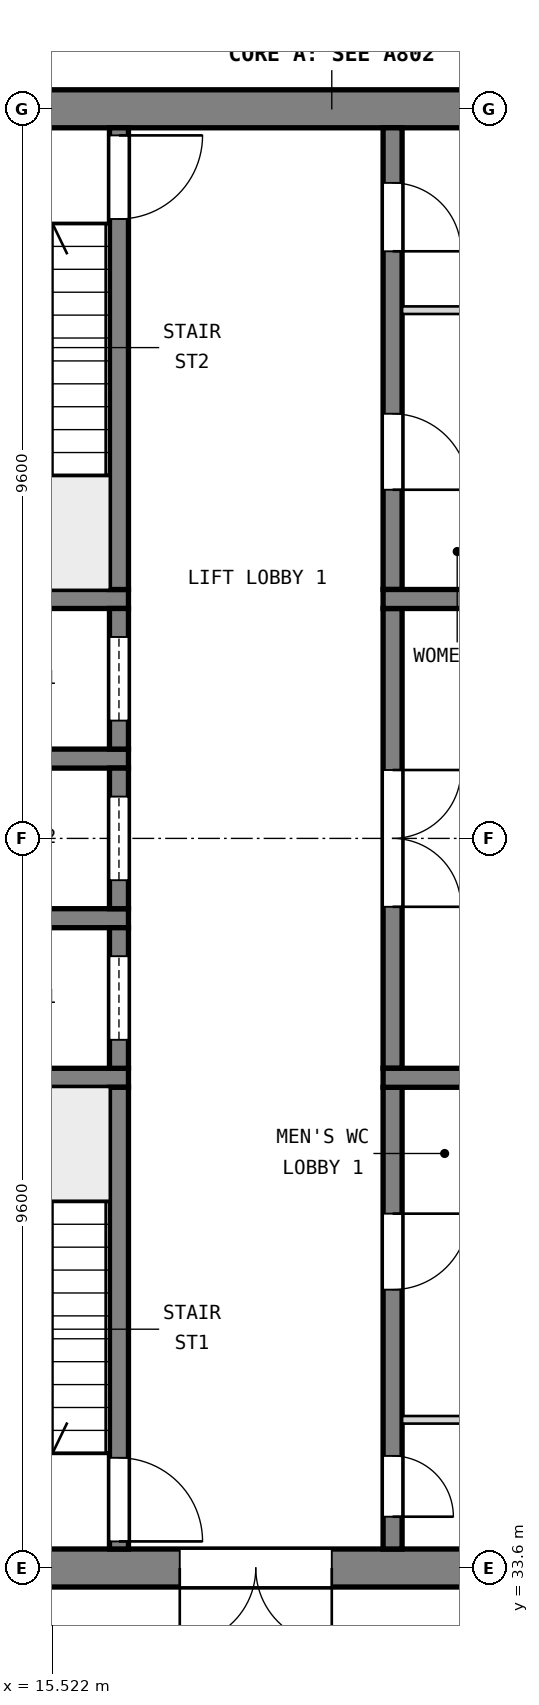
"""IFC4 building model, lengths in metres.
Left out: names, types, materials, properties, quantities, classifications, styles, units other than length and angle.
Written with IfcOpenShell. Run it as: python <this file> out.ifc"""

import sys

from ifc_helpers import new_model, si_unit, direction, frame, frame_2d, origin, place, context, subcontext, project, spatial, rectangle, extrude, element, fill, save


model = new_model("IFC4")
c1 = context("Model", 3, precision=1e-05, world=origin(), true_north=direction((0.0, 1.0)))
c2 = subcontext(c1, "Body", "Model", "MODEL_VIEW")
j1 = project(units=[si_unit("LENGTHUNIT", "METRE"), si_unit("PLANEANGLEUNIT", "RADIAN")], contexts=[c1])
p1 = place(None, origin())
s1 = spatial("IfcSite", under=j1, at=p1, CompositionType="ELEMENT")
p2 = place(p1, origin())
s2 = spatial("IfcBuilding", under=s1, at=p2, CompositionType="ELEMENT")
p3 = place(p2, origin())
s3 = spatial("IfcBuildingStorey", under=s2, at=p3, CompositionType="ELEMENT", Elevation=0.0)
p4 = place(p3, frame((12.55, 52.8, 0.0), z_axis=(0.0, 0.0, 1.0), x_axis=(1.0, 0.0, 0.0)))
e1 = element("IfcWall", 1, at=p4, inside=s3, PredefinedType="SHEAR", context=c2, shape_type="SweptSolid", body=[
    extrude(rectangle(XDim=13.3, YDim=0.5, at=frame_2d((6.65, 0.0))), origin(), (0.0, 0.0, 1.0), 4.2),
])
p5 = place(p4, frame((0.55, 0.0, 0.0)))
e2 = element("IfcOpeningElement", 2, at=p5, cuts=e1, PredefinedType="OPENING", context=c2, shape_type="SweptSolid", body=[
    extrude(rectangle(XDim=1.8, YDim=2.1, at=frame_2d((0.9, 1.05))), frame((0.0, 0.26, 0.0), z_axis=(0.0, -1.0, 0.0), x_axis=(1.0, 0.0, 0.0)), (0.0, 0.0, 1.0), 0.52),
])
p6 = place(p3, frame((12.55, 33.6, 0.0), z_axis=(0.0, 0.0, 1.0), x_axis=(1.0, 0.0, 0.0)))
e3 = element("IfcWall", 3, at=p6, inside=s3, PredefinedType="SHEAR", context=c2, shape_type="SweptSolid", body=[
    extrude(rectangle(XDim=13.3, YDim=0.5, at=frame_2d((6.65, 0.0))), origin(), (0.0, 0.0, 1.0), 4.2),
])
p7 = place(p6, frame((4.65, 0.0, 0.0)))
e4 = element("IfcOpeningElement", 4, at=p7, cuts=e3, PredefinedType="OPENING", context=c2, shape_type="SweptSolid", body=[
    extrude(rectangle(XDim=2.0, YDim=2.1, at=frame_2d((1.0, 1.05))), frame((0.0, 0.26, 0.0), z_axis=(0.0, -1.0, 0.0), x_axis=(1.0, 0.0, 0.0)), (0.0, 0.0, 1.0), 0.52),
])
p8 = place(p6, frame((0.55, 0.0, 0.0)))
e5 = element("IfcOpeningElement", 5, at=p8, cuts=e3, PredefinedType="OPENING", context=c2, shape_type="SweptSolid", body=[
    extrude(rectangle(XDim=1.8, YDim=2.1, at=frame_2d((0.9, 1.05))), frame((0.0, 0.26, 0.0), z_axis=(0.0, -1.0, 0.0), x_axis=(1.0, 0.0, 0.0)), (0.0, 0.0, 1.0), 0.52),
])
for number, where, z_axis, x_axis in (
    (6, (13.05, 40.05, 0.0), (0.0, 0.0, 1.0), (1.0, 0.0, 0.0)),
    (7, (13.05, 42.15, 0.0), (0.0, 0.0, 1.0), (1.0, 0.0, 0.0)),
    (8, (13.05, 44.25, 0.0), (0.0, 0.0, 1.0), (1.0, 0.0, 0.0)),
    (9, (13.05, 46.35, 0.0), (0.0, 0.0, 1.0), (1.0, 0.0, 0.0)),
):
    element("IfcWall", number, at=place(p3, frame(where, z_axis=z_axis, x_axis=x_axis)), inside=s3, PredefinedType="SOLIDWALL", context=c2, shape_type="SweptSolid", body=[
        extrude(rectangle(XDim=3.475, YDim=0.25, at=frame_2d((1.737, 0.0))), origin(), (0.0, 0.0, 1.0), 3.9),
    ])
p9 = place(p3, frame((16.4, 33.85, 0.0), z_axis=(0.0, 0.0, 1.0), x_axis=(0.0, 1.0, 0.0)))
e10 = element("IfcWall", 10, at=p9, inside=s3, PredefinedType="SOLIDWALL", context=c2, shape_type="SweptSolid", body=[
    extrude(rectangle(XDim=6.075, YDim=0.25, at=frame_2d((3.038, 0.0))), origin(), (0.0, 0.0, 1.0), 3.9),
])
p10 = place(p9, frame((0.1, 0.0, 0.0)))
e11 = element("IfcOpeningElement", 11, at=p10, cuts=e10, PredefinedType="OPENING", context=c2, shape_type="SweptSolid", body=[
    extrude(rectangle(XDim=1.1, YDim=2.1, at=frame_2d((0.55, 1.05))), frame((0.0, 0.135, 0.0), z_axis=(0.0, -1.0, 0.0), x_axis=(1.0, 0.0, 0.0)), (0.0, 0.0, 1.0), 0.27),
])
p11 = place(p3, frame((16.4, 40.175, 0.0), z_axis=(0.0, 0.0, 1.0), x_axis=(0.0, 1.0, 0.0)))
e12 = element("IfcWall", 12, at=p11, inside=s3, PredefinedType="SOLIDWALL", context=c2, shape_type="SweptSolid", body=[
    extrude(rectangle(XDim=1.85, YDim=0.25, at=frame_2d((0.925, 0.0))), origin(), (0.0, 0.0, 1.0), 3.9),
])
p12 = place(p11, frame((0.375, 0.0, 0.0)))
e13 = element("IfcOpeningElement", 13, at=p12, cuts=e12, PredefinedType="OPENING", context=c2, shape_type="SweptSolid", body=[
    extrude(rectangle(XDim=1.1, YDim=2.1, at=frame_2d((0.55, 1.05))), frame((0.0, 0.135, 0.0), z_axis=(0.0, -1.0, 0.0), x_axis=(1.0, 0.0, 0.0)), (0.0, 0.0, 1.0), 0.27),
])
p13 = place(p3, frame((16.4, 42.275, 0.0), z_axis=(0.0, 0.0, 1.0), x_axis=(0.0, 1.0, 0.0)))
e14 = element("IfcWall", 14, at=p13, inside=s3, PredefinedType="SOLIDWALL", context=c2, shape_type="SweptSolid", body=[
    extrude(rectangle(XDim=1.85, YDim=0.25, at=frame_2d((0.925, 0.0))), origin(), (0.0, 0.0, 1.0), 3.9),
])
p14 = place(p13, frame((0.375, 0.0, 0.0)))
e15 = element("IfcOpeningElement", 15, at=p14, cuts=e14, PredefinedType="OPENING", context=c2, shape_type="SweptSolid", body=[
    extrude(rectangle(XDim=1.1, YDim=2.1, at=frame_2d((0.55, 1.05))), frame((0.0, 0.135, 0.0), z_axis=(0.0, -1.0, 0.0), x_axis=(1.0, 0.0, 0.0)), (0.0, 0.0, 1.0), 0.27),
])
p15 = place(p3, frame((16.4, 44.375, 0.0), z_axis=(0.0, 0.0, 1.0), x_axis=(0.0, 1.0, 0.0)))
e16 = element("IfcWall", 16, at=p15, inside=s3, PredefinedType="SOLIDWALL", context=c2, shape_type="SweptSolid", body=[
    extrude(rectangle(XDim=1.85, YDim=0.25, at=frame_2d((0.925, 0.0))), origin(), (0.0, 0.0, 1.0), 3.9),
])
p16 = place(p15, frame((0.375, 0.0, 0.0)))
e17 = element("IfcOpeningElement", 17, at=p16, cuts=e16, PredefinedType="OPENING", context=c2, shape_type="SweptSolid", body=[
    extrude(rectangle(XDim=1.1, YDim=2.1, at=frame_2d((0.55, 1.05))), frame((0.0, 0.135, 0.0), z_axis=(0.0, -1.0, 0.0), x_axis=(1.0, 0.0, 0.0)), (0.0, 0.0, 1.0), 0.27),
])
p17 = place(p3, frame((16.4, 46.475, 0.0), z_axis=(0.0, 0.0, 1.0), x_axis=(0.0, 1.0, 0.0)))
e18 = element("IfcWall", 18, at=p17, inside=s3, PredefinedType="SOLIDWALL", context=c2, shape_type="SweptSolid", body=[
    extrude(rectangle(XDim=6.075, YDim=0.25, at=frame_2d((3.038, 0.0))), origin(), (0.0, 0.0, 1.0), 3.9),
])
p18 = place(p17, frame((4.875, 0.0, 0.0)))
e19 = element("IfcOpeningElement", 19, at=p18, cuts=e18, PredefinedType="OPENING", context=c2, shape_type="SweptSolid", body=[
    extrude(rectangle(XDim=1.1, YDim=2.1, at=frame_2d((0.55, 1.05))), frame((0.0, 0.135, 0.0), z_axis=(0.0, -1.0, 0.0), x_axis=(1.0, 0.0, 0.0)), (0.0, 0.0, 1.0), 0.27),
])
p19 = place(p3, frame((20.0, 33.85, 0.0), z_axis=(0.0, 0.0, 1.0), x_axis=(0.0, 1.0, 0.0)))
e20 = element("IfcWall", 20, at=p19, inside=s3, PredefinedType="SOLIDWALL", context=c2, shape_type="SweptSolid", body=[
    extrude(rectangle(XDim=6.075, YDim=0.25, at=frame_2d((3.038, 0.0))), origin(), (0.0, 0.0, 1.0), 3.9),
])
p20 = place(p19, frame((0.425, 0.0, 0.0)))
e21 = element("IfcOpeningElement", 21, at=p20, cuts=e20, PredefinedType="OPENING", context=c2, shape_type="SweptSolid", body=[
    extrude(rectangle(XDim=0.8, YDim=2.1, at=frame_2d((0.4, 1.05))), frame((0.0, 0.135, 0.0), z_axis=(0.0, -1.0, 0.0), x_axis=(1.0, 0.0, 0.0)), (0.0, 0.0, 1.0), 0.27),
])
p21 = place(p19, frame((3.413, 0.0, 0.0)))
e22 = element("IfcOpeningElement", 22, at=p21, cuts=e20, PredefinedType="OPENING", context=c2, shape_type="SweptSolid", body=[
    extrude(rectangle(XDim=1.0, YDim=2.1, at=frame_2d((0.5, 1.05))), frame((0.0, 0.135, 0.0), z_axis=(0.0, -1.0, 0.0), x_axis=(1.0, 0.0, 0.0)), (0.0, 0.0, 1.0), 0.27),
])
p22 = place(p3, frame((20.0, 40.175, 0.0), z_axis=(0.0, 0.0, 1.0), x_axis=(0.0, 1.0, 0.0)))
e23 = element("IfcWall", 23, at=p22, inside=s3, PredefinedType="SOLIDWALL", context=c2, shape_type="SweptSolid", body=[
    extrude(rectangle(XDim=6.05, YDim=0.25, at=frame_2d((3.025, 0.0))), origin(), (0.0, 0.0, 1.0), 3.9),
])
p23 = place(p22, frame((2.125, 0.0, 0.0)))
e24 = element("IfcOpeningElement", 24, at=p23, cuts=e23, PredefinedType="OPENING", context=c2, shape_type="SweptSolid", body=[
    extrude(rectangle(XDim=1.8, YDim=2.1, at=frame_2d((0.9, 1.05))), frame((0.0, 0.135, 0.0), z_axis=(0.0, -1.0, 0.0), x_axis=(1.0, 0.0, 0.0)), (0.0, 0.0, 1.0), 0.27),
])
p24 = place(p3, frame((20.0, 46.475, 0.0), z_axis=(0.0, 0.0, 1.0), x_axis=(0.0, 1.0, 0.0)))
e25 = element("IfcWall", 25, at=p24, inside=s3, PredefinedType="SOLIDWALL", context=c2, shape_type="SweptSolid", body=[
    extrude(rectangle(XDim=6.075, YDim=0.25, at=frame_2d((3.038, 0.0))), origin(), (0.0, 0.0, 1.0), 3.9),
])
p25 = place(p24, frame((1.312, 0.0, 0.0)))
e26 = element("IfcOpeningElement", 26, at=p25, cuts=e25, PredefinedType="OPENING", context=c2, shape_type="SweptSolid", body=[
    extrude(rectangle(XDim=1.0, YDim=2.1, at=frame_2d((0.5, 1.05))), frame((0.0, 0.135, 0.0), z_axis=(0.0, -1.0, 0.0), x_axis=(1.0, 0.0, 0.0)), (0.0, 0.0, 1.0), 0.27),
])
p26 = place(p24, frame((4.45, 0.0, 0.0)))
e27 = element("IfcOpeningElement", 27, at=p26, cuts=e25, PredefinedType="OPENING", context=c2, shape_type="SweptSolid", body=[
    extrude(rectangle(XDim=0.9, YDim=2.1, at=frame_2d((0.45, 1.05))), frame((0.0, 0.135, 0.0), z_axis=(0.0, -1.0, 0.0), x_axis=(1.0, 0.0, 0.0)), (0.0, 0.0, 1.0), 0.27),
])
for number, where, z_axis, x_axis in (
    (28, (19.875, 40.05, 0.0), (0.0, 0.0, 1.0), (1.0, 0.0, 0.0)),
    (29, (19.875, 46.35, 0.0), (0.0, 0.0, 1.0), (1.0, 0.0, 0.0)),
):
    element("IfcWall", number, at=place(p3, frame(where, z_axis=z_axis, x_axis=x_axis)), inside=s3, PredefinedType="SOLIDWALL", context=c2, shape_type="SweptSolid", body=[
        extrude(rectangle(XDim=5.425, YDim=0.25, at=frame_2d((2.712, 0.0))), origin(), (0.0, 0.0, 1.0), 3.9),
    ])
for number, where, z_axis, x_axis in (
    (30, (20.125, 35.55, 0.0), (0.0, 0.0, 1.0), (1.0, 0.0, 0.0)),
    (31, (20.125, 50.15, 0.0), (0.0, 0.0, 1.0), (1.0, 0.0, 0.0)),
):
    element("IfcWall", number, at=place(p3, frame(where, z_axis=z_axis, x_axis=x_axis)), inside=s3, PredefinedType="PARTITIONING", context=c2, shape_type="SweptSolid", body=[
        extrude(rectangle(XDim=5.175, YDim=0.1, at=frame_2d((2.587, 0.0))), origin(), (0.0, 0.0, 1.0), 3.9),
    ])
p27 = place(p10, frame((1.1, 0.0, 0.0), z_axis=(0.0, 0.0, 1.0), x_axis=(-1.0, 0.0, 0.0)))
e32 = element("IfcDoor", 32, at=p27, inside=s3, OperationType="SINGLE_SWING_RIGHT", PredefinedType="DOOR", context=c2, shape_type="SweptSolid", body=[
    extrude(rectangle(XDim=1.1, YDim=2.1, at=frame_2d((0.55, 1.05))), frame((0.0, 0.025, 0.0), z_axis=(0.0, -1.0, 0.0), x_axis=(1.0, 0.0, 0.0)), (0.0, 0.0, 1.0), 0.05),
])
fill(e11, e32)
p28 = place(p18, frame((1.1, 0.0, 0.0), z_axis=(0.0, 0.0, 1.0), x_axis=(-1.0, 0.0, 0.0)))
e33 = element("IfcDoor", 33, at=p28, inside=s3, OperationType="SINGLE_SWING_LEFT", PredefinedType="DOOR", context=c2, shape_type="SweptSolid", body=[
    extrude(rectangle(XDim=1.1, YDim=2.1, at=frame_2d((0.55, 1.05))), frame((0.0, 0.025, 0.0), z_axis=(0.0, -1.0, 0.0), x_axis=(1.0, 0.0, 0.0)), (0.0, 0.0, 1.0), 0.05),
])
fill(e19, e33)
p29 = place(p12, origin())
e34 = element("IfcDoor", 34, at=p29, inside=s3, OperationType="SLIDING_TO_LEFT", PredefinedType="DOOR", context=c2, shape_type="SweptSolid", body=[
    extrude(rectangle(XDim=1.1, YDim=2.1, at=frame_2d((0.55, 1.05))), frame((0.0, 0.025, 0.0), z_axis=(0.0, -1.0, 0.0), x_axis=(1.0, 0.0, 0.0)), (0.0, 0.0, 1.0), 0.05),
])
fill(e13, e34)
p30 = place(p14, origin())
e35 = element("IfcDoor", 35, at=p30, inside=s3, OperationType="SLIDING_TO_LEFT", PredefinedType="DOOR", context=c2, shape_type="SweptSolid", body=[
    extrude(rectangle(XDim=1.1, YDim=2.1, at=frame_2d((0.55, 1.05))), frame((0.0, 0.025, 0.0), z_axis=(0.0, -1.0, 0.0), x_axis=(1.0, 0.0, 0.0)), (0.0, 0.0, 1.0), 0.05),
])
fill(e15, e35)
p31 = place(p16, origin())
e36 = element("IfcDoor", 36, at=p31, inside=s3, OperationType="SLIDING_TO_LEFT", PredefinedType="DOOR", context=c2, shape_type="SweptSolid", body=[
    extrude(rectangle(XDim=1.1, YDim=2.1, at=frame_2d((0.55, 1.05))), frame((0.0, 0.025, 0.0), z_axis=(0.0, -1.0, 0.0), x_axis=(1.0, 0.0, 0.0)), (0.0, 0.0, 1.0), 0.05),
])
fill(e17, e36)
p32 = place(p23, frame((1.8, 0.0, 0.0), z_axis=(0.0, 0.0, 1.0), x_axis=(-1.0, 0.0, 0.0)))
e37 = element("IfcDoor", 37, at=p32, inside=s3, OperationType="DOUBLE_DOOR_SINGLE_SWING", PredefinedType="DOOR", context=c2, shape_type="SweptSolid", body=[
    extrude(rectangle(XDim=1.8, YDim=2.1, at=frame_2d((0.9, 1.05))), frame((0.0, 0.025, 0.0), z_axis=(0.0, -1.0, 0.0), x_axis=(1.0, 0.0, 0.0)), (0.0, 0.0, 1.0), 0.05),
])
fill(e24, e37)
p33 = place(p20, frame((0.8, 0.0, 0.0), z_axis=(0.0, 0.0, 1.0), x_axis=(-1.0, 0.0, 0.0)))
e38 = element("IfcDoor", 38, at=p33, inside=s3, OperationType="SINGLE_SWING_RIGHT", PredefinedType="DOOR", context=c2, shape_type="SweptSolid", body=[
    extrude(rectangle(XDim=0.8, YDim=2.1, at=frame_2d((0.4, 1.05))), frame((0.0, 0.025, 0.0), z_axis=(0.0, -1.0, 0.0), x_axis=(1.0, 0.0, 0.0)), (0.0, 0.0, 1.0), 0.05),
])
fill(e21, e38)
p34 = place(p21, frame((1.0, 0.0, 0.0), z_axis=(0.0, 0.0, 1.0), x_axis=(-1.0, 0.0, 0.0)))
e39 = element("IfcDoor", 39, at=p34, inside=s3, OperationType="SINGLE_SWING_LEFT", PredefinedType="DOOR", context=c2, shape_type="SweptSolid", body=[
    extrude(rectangle(XDim=1.0, YDim=2.1, at=frame_2d((0.5, 1.05))), frame((0.0, 0.025, 0.0), z_axis=(0.0, -1.0, 0.0), x_axis=(1.0, 0.0, 0.0)), (0.0, 0.0, 1.0), 0.05),
])
fill(e22, e39)
p35 = place(p25, frame((1.0, 0.0, 0.0), z_axis=(0.0, 0.0, 1.0), x_axis=(-1.0, 0.0, 0.0)))
e40 = element("IfcDoor", 40, at=p35, inside=s3, OperationType="SINGLE_SWING_RIGHT", PredefinedType="DOOR", context=c2, shape_type="SweptSolid", body=[
    extrude(rectangle(XDim=1.0, YDim=2.1, at=frame_2d((0.5, 1.05))), frame((0.0, 0.025, 0.0), z_axis=(0.0, -1.0, 0.0), x_axis=(1.0, 0.0, 0.0)), (0.0, 0.0, 1.0), 0.05),
])
fill(e26, e40)
p36 = place(p26, frame((0.9, 0.0, 0.0), z_axis=(0.0, 0.0, 1.0), x_axis=(-1.0, 0.0, 0.0)))
e41 = element("IfcDoor", 41, at=p36, inside=s3, OperationType="SINGLE_SWING_RIGHT", PredefinedType="DOOR", context=c2, shape_type="SweptSolid", body=[
    extrude(rectangle(XDim=0.9, YDim=2.1, at=frame_2d((0.45, 1.05))), frame((0.0, 0.025, 0.0), z_axis=(0.0, -1.0, 0.0), x_axis=(1.0, 0.0, 0.0)), (0.0, 0.0, 1.0), 0.05),
])
fill(e27, e41)
p37 = place(p7, frame((2.0, 0.0, 0.0), z_axis=(0.0, 0.0, 1.0), x_axis=(-1.0, 0.0, 0.0)))
e42 = element("IfcDoor", 42, at=p37, inside=s3, OperationType="DOUBLE_DOOR_SINGLE_SWING", PredefinedType="DOOR", context=c2, shape_type="SweptSolid", body=[
    extrude(rectangle(XDim=2.0, YDim=2.1, at=frame_2d((1.0, 1.05))), frame((0.0, 0.025, 0.0), z_axis=(0.0, -1.0, 0.0), x_axis=(1.0, 0.0, 0.0)), (0.0, 0.0, 1.0), 0.05),
])
fill(e4, e42)
save(model, sys.argv[1])
